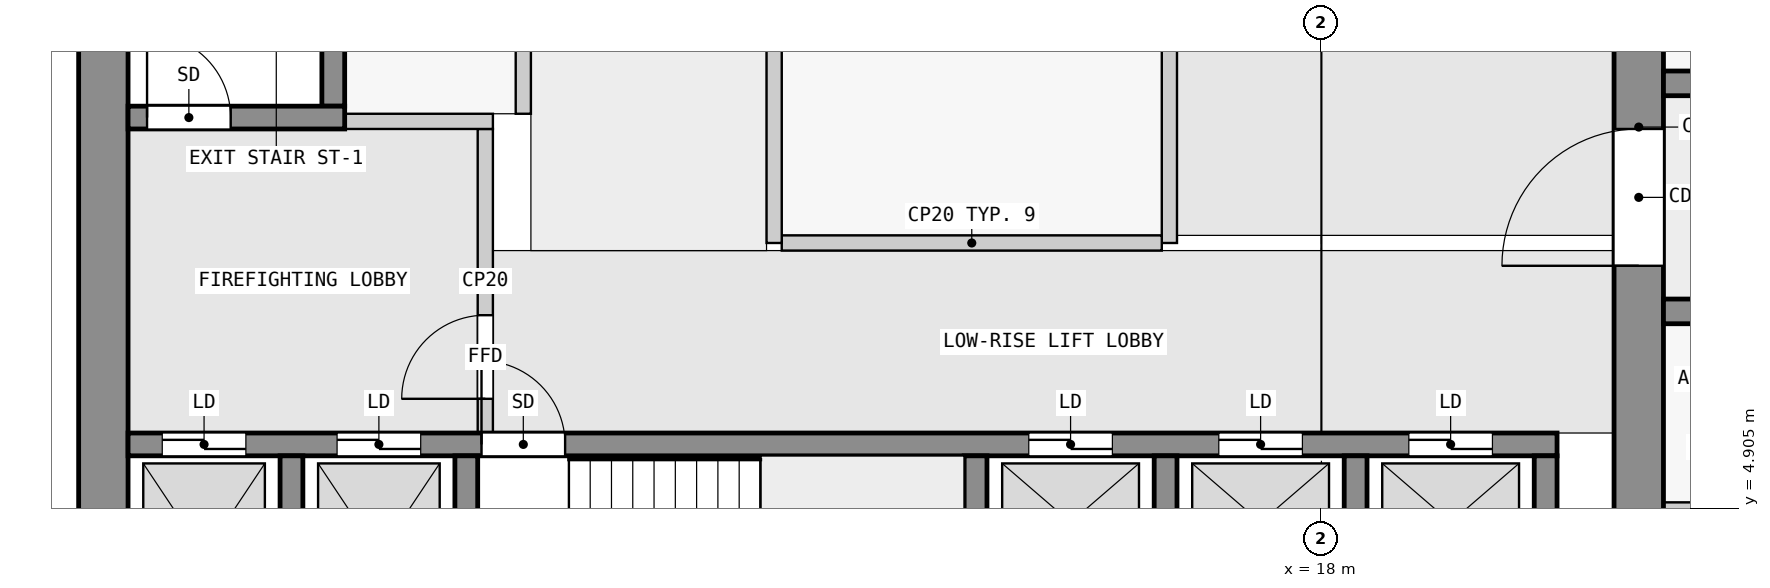
"""IFC4 building model, lengths in metres.
Left out: names, types, materials, properties, quantities, classifications, styles, units other than length and angle.
Written with IfcOpenShell. Run it as: python <this file> out.ifc"""

import sys

from ifc_helpers import new_model, si_unit, direction, frame, frame_2d, origin, place, context, subcontext, project, spatial, rectangle, extrude, element, fill, save


model = new_model("IFC4")
c1 = context("Model", 3, precision=1e-05, world=origin(), true_north=direction((0.0, 1.0)))
c2 = subcontext(c1, "Body", "Model", "MODEL_VIEW")
j1 = project(units=[si_unit("LENGTHUNIT", "METRE"), si_unit("PLANEANGLEUNIT", "RADIAN")], contexts=[c1])
p1 = place(None, origin())
s1 = spatial("IfcSite", under=j1, at=p1, CompositionType="ELEMENT")
p2 = place(p1, origin())
s2 = spatial("IfcBuilding", under=s1, at=p2, CompositionType="ELEMENT")
p3 = place(p2, frame((0.0, 0.0, 113.3)))
s3 = spatial("IfcBuildingStorey", under=s2, at=p3, CompositionType="ELEMENT", Elevation=113.3)
p4 = place(p3, frame((1.975, 2.5, 0.0), z_axis=(0.0, 0.0, 1.0), x_axis=(0.0, 1.0, 0.0)))
e1 = element("IfcWall", 1, at=p4, inside=s3, PredefinedType="SHEAR", context=c2, shape_type="SweptSolid", body=[
    extrude(rectangle(XDim=14.85, YDim=0.65, at=frame_2d((7.425, 0.0))), origin(), (0.0, 0.0, 1.0), 3.25),
])
p5 = place(p3, frame((22.175, 2.5, 0.0), z_axis=(0.0, 0.0, 1.0), x_axis=(0.0, 1.0, 0.0)))
e2 = element("IfcWall", 2, at=p5, inside=s3, PredefinedType="SHEAR", context=c2, shape_type="SweptSolid", body=[
    extrude(rectangle(XDim=14.85, YDim=0.65, at=frame_2d((7.425, 0.0))), origin(), (0.0, 0.0, 1.0), 3.25),
])
p6 = place(p5, frame((5.6, 0.0, 0.0)))
e3 = element("IfcOpeningElement", 3, at=p6, cuts=e2, PredefinedType="OPENING", context=c2, shape_type="SweptSolid", body=[
    extrude(rectangle(XDim=1.8, YDim=2.1, at=frame_2d((0.9, 1.05))), frame((0.0, 0.335, 0.0), z_axis=(0.0, -1.0, 0.0), x_axis=(1.0, 0.0, 0.0)), (0.0, 0.0, 1.0), 0.67),
])
for number, where, z_axis, x_axis in (
    (4, (4.45, 2.8, 0.0), (0.0, 0.0, 1.0), (0.0, 1.0, 0.0)),
    (5, (6.75, 2.8, 0.0), (0.0, 0.0, 1.0), (0.0, 1.0, 0.0)),
    (6, (13.45, 2.8, 0.0), (0.0, 0.0, 1.0), (0.0, 1.0, 0.0)),
    (7, (15.95, 2.8, 0.0), (0.0, 0.0, 1.0), (0.0, 1.0, 0.0)),
    (8, (18.45, 2.8, 0.0), (0.0, 0.0, 1.0), (0.0, 1.0, 0.0)),
    (9, (20.95, 2.8, 0.0), (0.0, 0.0, 1.0), (0.0, 1.0, 0.0)),
):
    element("IfcWall", number, at=place(p3, frame(where, z_axis=z_axis, x_axis=x_axis)), inside=s3, PredefinedType="SHEAR", context=c2, shape_type="SweptSolid", body=[
        extrude(rectangle(XDim=2.8, YDim=0.3, at=frame_2d((1.4, 0.0))), origin(), (0.0, 0.0, 1.0), 3.25),
    ])
p7 = place(p3, frame((2.3, 5.75, 0.0), z_axis=(0.0, 0.0, 1.0), x_axis=(1.0, 0.0, 0.0)))
e10 = element("IfcWall", 10, at=p7, inside=s3, PredefinedType="SHEAR", context=c2, shape_type="SweptSolid", body=[
    extrude(rectangle(XDim=18.8, YDim=0.3, at=frame_2d((9.4, 0.0))), origin(), (0.0, 0.0, 1.0), 3.25),
])
p8 = place(p7, frame((4.65, 0.0, 0.0)))
e11 = element("IfcOpeningElement", 11, at=p8, cuts=e10, PredefinedType="OPENING", context=c2, shape_type="SweptSolid", body=[
    extrude(rectangle(XDim=1.1, YDim=2.1, at=frame_2d((0.55, 1.05))), frame((0.0, 0.16, 0.0), z_axis=(0.0, -1.0, 0.0), x_axis=(1.0, 0.0, 0.0)), (0.0, 0.0, 1.0), 0.32),
])
p9 = place(p7, frame((0.45, 0.0, 0.0)))
e12 = element("IfcOpeningElement", 12, at=p9, cuts=e10, PredefinedType="OPENING", context=c2, shape_type="SweptSolid", body=[
    extrude(rectangle(XDim=1.1, YDim=2.1, at=frame_2d((0.55, 1.05))), frame((0.0, 0.16, 0.0), z_axis=(0.0, -1.0, 0.0), x_axis=(1.0, 0.0, 0.0)), (0.0, 0.0, 1.0), 0.32),
])
p10 = place(p7, frame((2.75, 0.0, 0.0)))
e13 = element("IfcOpeningElement", 13, at=p10, cuts=e10, PredefinedType="OPENING", context=c2, shape_type="SweptSolid", body=[
    extrude(rectangle(XDim=1.1, YDim=2.1, at=frame_2d((0.55, 1.05))), frame((0.0, 0.16, 0.0), z_axis=(0.0, -1.0, 0.0), x_axis=(1.0, 0.0, 0.0)), (0.0, 0.0, 1.0), 0.32),
])
p11 = place(p7, frame((11.85, 0.0, 0.0)))
e14 = element("IfcOpeningElement", 14, at=p11, cuts=e10, PredefinedType="OPENING", context=c2, shape_type="SweptSolid", body=[
    extrude(rectangle(XDim=1.1, YDim=2.1, at=frame_2d((0.55, 1.05))), frame((0.0, 0.16, 0.0), z_axis=(0.0, -1.0, 0.0), x_axis=(1.0, 0.0, 0.0)), (0.0, 0.0, 1.0), 0.32),
])
p12 = place(p7, frame((14.35, 0.0, 0.0)))
e15 = element("IfcOpeningElement", 15, at=p12, cuts=e10, PredefinedType="OPENING", context=c2, shape_type="SweptSolid", body=[
    extrude(rectangle(XDim=1.1, YDim=2.1, at=frame_2d((0.55, 1.05))), frame((0.0, 0.16, 0.0), z_axis=(0.0, -1.0, 0.0), x_axis=(1.0, 0.0, 0.0)), (0.0, 0.0, 1.0), 0.32),
])
p13 = place(p7, frame((16.85, 0.0, 0.0)))
e16 = element("IfcOpeningElement", 16, at=p13, cuts=e10, PredefinedType="OPENING", context=c2, shape_type="SweptSolid", body=[
    extrude(rectangle(XDim=1.1, YDim=2.1, at=frame_2d((0.55, 1.05))), frame((0.0, 0.16, 0.0), z_axis=(0.0, -1.0, 0.0), x_axis=(1.0, 0.0, 0.0)), (0.0, 0.0, 1.0), 0.32),
])
p14 = place(p3, frame((2.3, 10.05, 0.0), z_axis=(0.0, 0.0, 1.0), x_axis=(1.0, 0.0, 0.0)))
e17 = element("IfcWall", 17, at=p14, inside=s3, PredefinedType="SHEAR", context=c2, shape_type="SweptSolid", body=[
    extrude(rectangle(XDim=2.85, YDim=0.3, at=frame_2d((1.425, 0.0))), origin(), (0.0, 0.0, 1.0), 3.25),
])
p15 = place(p14, frame((0.25, 0.0, 0.0)))
e18 = element("IfcOpeningElement", 18, at=p15, cuts=e17, PredefinedType="OPENING", context=c2, shape_type="SweptSolid", body=[
    extrude(rectangle(XDim=1.1, YDim=2.1, at=frame_2d((0.55, 1.05))), frame((0.0, 0.16, 0.0), z_axis=(0.0, -1.0, 0.0), x_axis=(1.0, 0.0, 0.0)), (0.0, 0.0, 1.0), 0.32),
])
p16 = place(p3, frame((5.0, 10.2, 0.0), z_axis=(0.0, 0.0, 1.0), x_axis=(0.0, 1.0, 0.0)))
e19 = element("IfcWall", 19, at=p16, inside=s3, PredefinedType="SHEAR", context=c2, shape_type="SweptSolid", body=[
    extrude(rectangle(XDim=6.4, YDim=0.3, at=frame_2d((3.2, 0.0))), origin(), (0.0, 0.0, 1.0), 3.25),
])
p17 = place(p3, frame((22.5, 7.5, 0.0), z_axis=(0.0, 0.0, 1.0), x_axis=(1.0, 0.0, 0.0)))
e20 = element("IfcWall", 20, at=p17, inside=s3, PredefinedType="SHEAR", context=c2, shape_type="SweptSolid", body=[
    extrude(rectangle(XDim=22.5, YDim=0.325, at=frame_2d((11.25, 0.0))), origin(), (0.0, 0.0, 1.0), 3.25),
])
p18 = place(p17, frame((4.05, 0.0, 0.0)))
e21 = element("IfcOpeningElement", 21, at=p18, cuts=e20, PredefinedType="OPENING", context=c2, shape_type="SweptSolid", body=[
    extrude(rectangle(XDim=1.0, YDim=2.1, at=frame_2d((0.5, 1.05))), frame((0.0, 0.172, 0.0), z_axis=(0.0, -1.0, 0.0), x_axis=(1.0, 0.0, 0.0)), (0.0, 0.0, 1.0), 0.345),
])
p19 = place(p17, frame((10.75, 0.0, 0.0)))
e22 = element("IfcOpeningElement", 22, at=p19, cuts=e20, PredefinedType="OPENING", context=c2, shape_type="SweptSolid", body=[
    extrude(rectangle(XDim=1.0, YDim=2.1, at=frame_2d((0.5, 1.05))), frame((0.0, 0.172, 0.0), z_axis=(0.0, -1.0, 0.0), x_axis=(1.0, 0.0, 0.0)), (0.0, 0.0, 1.0), 0.345),
])
p20 = place(p17, frame((16.85, 0.0, 0.0)))
e23 = element("IfcOpeningElement", 23, at=p20, cuts=e20, PredefinedType="OPENING", context=c2, shape_type="SweptSolid", body=[
    extrude(rectangle(XDim=1.0, YDim=2.1, at=frame_2d((0.5, 1.05))), frame((0.0, 0.172, 0.0), z_axis=(0.0, -1.0, 0.0), x_axis=(1.0, 0.0, 0.0)), (0.0, 0.0, 1.0), 0.345),
])
p21 = place(p3, frame((22.5, 10.5, 0.0), z_axis=(0.0, 0.0, 1.0), x_axis=(1.0, 0.0, 0.0)))
e24 = element("IfcWall", 24, at=p21, inside=s3, PredefinedType="SHEAR", context=c2, shape_type="SweptSolid", body=[
    extrude(rectangle(XDim=22.5, YDim=0.325, at=frame_2d((11.25, 0.0))), origin(), (0.0, 0.0, 1.0), 3.25),
])
p22 = place(p21, frame((1.85, 0.0, 0.0)))
e25 = element("IfcOpeningElement", 25, at=p22, cuts=e24, PredefinedType="OPENING", context=c2, shape_type="SweptSolid", body=[
    extrude(rectangle(XDim=0.9, YDim=2.1, at=frame_2d((0.45, 1.05))), frame((0.0, 0.172, 0.0), z_axis=(0.0, -1.0, 0.0), x_axis=(1.0, 0.0, 0.0)), (0.0, 0.0, 1.0), 0.345),
])
p23 = place(p21, frame((6.25, 0.0, 0.0)))
e26 = element("IfcOpeningElement", 26, at=p23, cuts=e24, PredefinedType="OPENING", context=c2, shape_type="SweptSolid", body=[
    extrude(rectangle(XDim=1.0, YDim=2.1, at=frame_2d((0.5, 1.05))), frame((0.0, 0.172, 0.0), z_axis=(0.0, -1.0, 0.0), x_axis=(1.0, 0.0, 0.0)), (0.0, 0.0, 1.0), 0.345),
])
p24 = place(p21, frame((13.05, 0.0, 0.0)))
e27 = element("IfcOpeningElement", 27, at=p24, cuts=e24, PredefinedType="OPENING", context=c2, shape_type="SweptSolid", body=[
    extrude(rectangle(XDim=1.0, YDim=2.1, at=frame_2d((0.5, 1.05))), frame((0.0, 0.172, 0.0), z_axis=(0.0, -1.0, 0.0), x_axis=(1.0, 0.0, 0.0)), (0.0, 0.0, 1.0), 0.345),
])
p25 = place(p21, frame((18.75, 0.0, 0.0)))
e28 = element("IfcOpeningElement", 28, at=p25, cuts=e24, PredefinedType="OPENING", context=c2, shape_type="SweptSolid", body=[
    extrude(rectangle(XDim=0.9, YDim=2.1, at=frame_2d((0.45, 1.05))), frame((0.0, 0.172, 0.0), z_axis=(0.0, -1.0, 0.0), x_axis=(1.0, 0.0, 0.0)), (0.0, 0.0, 1.0), 0.345),
])
p26 = place(p21, frame((20.95, 0.0, 0.0)))
e29 = element("IfcOpeningElement", 29, at=p26, cuts=e24, PredefinedType="OPENING", context=c2, shape_type="SweptSolid", body=[
    extrude(rectangle(XDim=1.0, YDim=2.1, at=frame_2d((0.5, 1.05))), frame((0.0, 0.172, 0.0), z_axis=(0.0, -1.0, 0.0), x_axis=(1.0, 0.0, 0.0)), (0.0, 0.0, 1.0), 0.345),
])
p27 = place(p3, frame((7.0, 5.9, 0.0), z_axis=(0.0, 0.0, 1.0), x_axis=(0.0, 1.0, 0.0)))
e30 = element("IfcWall", 30, at=p27, inside=s3, PredefinedType="PARTITIONING", context=c2, shape_type="SweptSolid", body=[
    extrude(rectangle(XDim=4.0, YDim=0.2, at=frame_2d((2.0, 0.0))), origin(), (0.0, 0.0, 1.0), 3.25),
])
p28 = place(p27, frame((0.45, 0.0, 0.0)))
e31 = element("IfcOpeningElement", 31, at=p28, cuts=e30, PredefinedType="OPENING", context=c2, shape_type="SweptSolid", body=[
    extrude(rectangle(XDim=1.1, YDim=2.1, at=frame_2d((0.55, 1.05))), frame((0.0, 0.11, 0.0), z_axis=(0.0, -1.0, 0.0), x_axis=(1.0, 0.0, 0.0)), (0.0, 0.0, 1.0), 0.22),
])
p29 = place(p3, frame((5.15, 10.0, 0.0), z_axis=(0.0, 0.0, 1.0), x_axis=(1.0, 0.0, 0.0)))
e32 = element("IfcWall", 32, at=p29, inside=s3, PredefinedType="PARTITIONING", context=c2, shape_type="SweptSolid", body=[
    extrude(rectangle(XDim=1.95, YDim=0.2, at=frame_2d((0.975, 0.0))), origin(), (0.0, 0.0, 1.0), 3.25),
])
p30 = place(p3, frame((10.8, 8.4, 0.0), z_axis=(0.0, 0.0, 1.0), x_axis=(0.0, 1.0, 0.0)))
e33 = element("IfcWall", 33, at=p30, inside=s3, PredefinedType="PARTITIONING", context=c2, shape_type="SweptSolid", body=[
    extrude(rectangle(XDim=6.2, YDim=0.2, at=frame_2d((3.1, 0.0))), origin(), (0.0, 0.0, 1.0), 3.25),
])
p31 = place(p3, frame((10.9, 8.4, 0.0), z_axis=(0.0, 0.0, 1.0), x_axis=(1.0, 0.0, 0.0)))
e34 = element("IfcWall", 34, at=p31, inside=s3, PredefinedType="PARTITIONING", context=c2, shape_type="SweptSolid", body=[
    extrude(rectangle(XDim=5.0, YDim=0.2, at=frame_2d((2.5, 0.0))), origin(), (0.0, 0.0, 1.0), 3.25),
])
p32 = place(p3, frame((16.0, 8.4, 0.0), z_axis=(0.0, 0.0, 1.0), x_axis=(0.0, 1.0, 0.0)))
e35 = element("IfcWall", 35, at=p32, inside=s3, PredefinedType="PARTITIONING", context=c2, shape_type="SweptSolid", body=[
    extrude(rectangle(XDim=6.2, YDim=0.2, at=frame_2d((3.1, 0.0))), origin(), (0.0, 0.0, 1.0), 3.25),
])
p33 = place(p32, frame((3.15, 0.0, 0.0)))
e36 = element("IfcOpeningElement", 36, at=p33, cuts=e35, PredefinedType="OPENING", context=c2, shape_type="SweptSolid", body=[
    extrude(rectangle(XDim=0.9, YDim=2.1, at=frame_2d((0.45, 1.05))), frame((0.0, 0.11, 0.0), z_axis=(0.0, -1.0, 0.0), x_axis=(1.0, 0.0, 0.0)), (0.0, 0.0, 1.0), 0.22),
])
p34 = place(p3, frame((7.5, 10.1, 0.0), z_axis=(0.0, 0.0, 1.0), x_axis=(0.0, 1.0, 0.0)))
e37 = element("IfcWall", 37, at=p34, inside=s3, PredefinedType="PARTITIONING", context=c2, shape_type="SweptSolid", body=[
    extrude(rectangle(XDim=7.25, YDim=0.2, at=frame_2d((3.625, 0.0))), origin(), (0.0, 0.0, 1.0), 3.25),
])
p35 = place(p34, frame((1.5, 0.0, 0.0)))
e38 = element("IfcOpeningElement", 38, at=p35, cuts=e37, PredefinedType="OPENING", context=c2, shape_type="SweptSolid", body=[
    extrude(rectangle(XDim=0.9, YDim=2.1, at=frame_2d((0.45, 1.05))), frame((0.0, 0.11, 0.0), z_axis=(0.0, -1.0, 0.0), x_axis=(1.0, 0.0, 0.0)), (0.0, 0.0, 1.0), 0.22),
])
p36 = place(p34, frame((5.125, 0.0, 0.0)))
e39 = element("IfcOpeningElement", 39, at=p36, cuts=e37, PredefinedType="OPENING", context=c2, shape_type="SweptSolid", body=[
    extrude(rectangle(XDim=0.9, YDim=2.1, at=frame_2d((0.45, 1.05))), frame((0.0, 0.11, 0.0), z_axis=(0.0, -1.0, 0.0), x_axis=(1.0, 0.0, 0.0)), (0.0, 0.0, 1.0), 0.22),
])
p37 = place(p3, frame((22.5, 4.938, 0.0), z_axis=(0.0, 0.0, 1.0), x_axis=(1.0, 0.0, 0.0)))
e40 = element("IfcWall", 40, at=p37, inside=s3, PredefinedType="PARTITIONING", context=c2, shape_type="SweptSolid", body=[
    extrude(rectangle(XDim=1.75, YDim=0.1, at=frame_2d((0.875, 0.0))), origin(), (0.0, 0.0, 1.0), 3.25),
])
p38 = place(p28, origin())
e41 = element("IfcDoor", 41, at=p38, inside=s3, OperationType="SINGLE_SWING_LEFT", PredefinedType="DOOR", context=c2, shape_type="SweptSolid", body=[
    extrude(rectangle(XDim=1.1, YDim=2.1, at=frame_2d((0.55, 1.05))), frame((0.0, 0.025, 0.0), z_axis=(0.0, -1.0, 0.0), x_axis=(1.0, 0.0, 0.0)), (0.0, 0.0, 1.0), 0.05),
])
fill(e31, e41)
p39 = place(p15, origin())
e42 = element("IfcDoor", 42, at=p39, inside=s3, OperationType="SINGLE_SWING_RIGHT", PredefinedType="DOOR", context=c2, shape_type="SweptSolid", body=[
    extrude(rectangle(XDim=1.1, YDim=2.1, at=frame_2d((0.55, 1.05))), frame((0.0, 0.025, 0.0), z_axis=(0.0, -1.0, 0.0), x_axis=(1.0, 0.0, 0.0)), (0.0, 0.0, 1.0), 0.05),
])
fill(e18, e42)
p40 = place(p8, origin())
e43 = element("IfcDoor", 43, at=p40, inside=s3, OperationType="SINGLE_SWING_LEFT", PredefinedType="DOOR", context=c2, shape_type="SweptSolid", body=[
    extrude(rectangle(XDim=1.1, YDim=2.1, at=frame_2d((0.55, 1.05))), frame((0.0, 0.025, 0.0), z_axis=(0.0, -1.0, 0.0), x_axis=(1.0, 0.0, 0.0)), (0.0, 0.0, 1.0), 0.05),
])
fill(e11, e43)
p41 = place(p9, origin())
e44 = element("IfcDoor", 44, at=p41, inside=s3, OperationType="DOUBLE_DOOR_SLIDING", PredefinedType="DOOR", context=c2, shape_type="SweptSolid", body=[
    extrude(rectangle(XDim=1.1, YDim=2.1, at=frame_2d((0.55, 1.05))), frame((0.0, 0.025, 0.0), z_axis=(0.0, -1.0, 0.0), x_axis=(1.0, 0.0, 0.0)), (0.0, 0.0, 1.0), 0.05),
])
fill(e12, e44)
p42 = place(p10, origin())
e45 = element("IfcDoor", 45, at=p42, inside=s3, OperationType="DOUBLE_DOOR_SLIDING", PredefinedType="DOOR", context=c2, shape_type="SweptSolid", body=[
    extrude(rectangle(XDim=1.1, YDim=2.1, at=frame_2d((0.55, 1.05))), frame((0.0, 0.025, 0.0), z_axis=(0.0, -1.0, 0.0), x_axis=(1.0, 0.0, 0.0)), (0.0, 0.0, 1.0), 0.05),
])
fill(e13, e45)
p43 = place(p11, origin())
e46 = element("IfcDoor", 46, at=p43, inside=s3, OperationType="DOUBLE_DOOR_SLIDING", PredefinedType="DOOR", context=c2, shape_type="SweptSolid", body=[
    extrude(rectangle(XDim=1.1, YDim=2.1, at=frame_2d((0.55, 1.05))), frame((0.0, 0.025, 0.0), z_axis=(0.0, -1.0, 0.0), x_axis=(1.0, 0.0, 0.0)), (0.0, 0.0, 1.0), 0.05),
])
fill(e14, e46)
p44 = place(p12, origin())
e47 = element("IfcDoor", 47, at=p44, inside=s3, OperationType="DOUBLE_DOOR_SLIDING", PredefinedType="DOOR", context=c2, shape_type="SweptSolid", body=[
    extrude(rectangle(XDim=1.1, YDim=2.1, at=frame_2d((0.55, 1.05))), frame((0.0, 0.025, 0.0), z_axis=(0.0, -1.0, 0.0), x_axis=(1.0, 0.0, 0.0)), (0.0, 0.0, 1.0), 0.05),
])
fill(e15, e47)
p45 = place(p13, origin())
e48 = element("IfcDoor", 48, at=p45, inside=s3, OperationType="DOUBLE_DOOR_SLIDING", PredefinedType="DOOR", context=c2, shape_type="SweptSolid", body=[
    extrude(rectangle(XDim=1.1, YDim=2.1, at=frame_2d((0.55, 1.05))), frame((0.0, 0.025, 0.0), z_axis=(0.0, -1.0, 0.0), x_axis=(1.0, 0.0, 0.0)), (0.0, 0.0, 1.0), 0.05),
])
fill(e16, e48)
p46 = place(p6, origin())
e49 = element("IfcDoor", 49, at=p46, inside=s3, OperationType="DOUBLE_DOOR_SINGLE_SWING", PredefinedType="DOOR", context=c2, shape_type="SweptSolid", body=[
    extrude(rectangle(XDim=1.8, YDim=2.1, at=frame_2d((0.9, 1.05))), frame((0.0, 0.025, 0.0), z_axis=(0.0, -1.0, 0.0), x_axis=(1.0, 0.0, 0.0)), (0.0, 0.0, 1.0), 0.05),
])
fill(e3, e49)
save(model, sys.argv[1])
